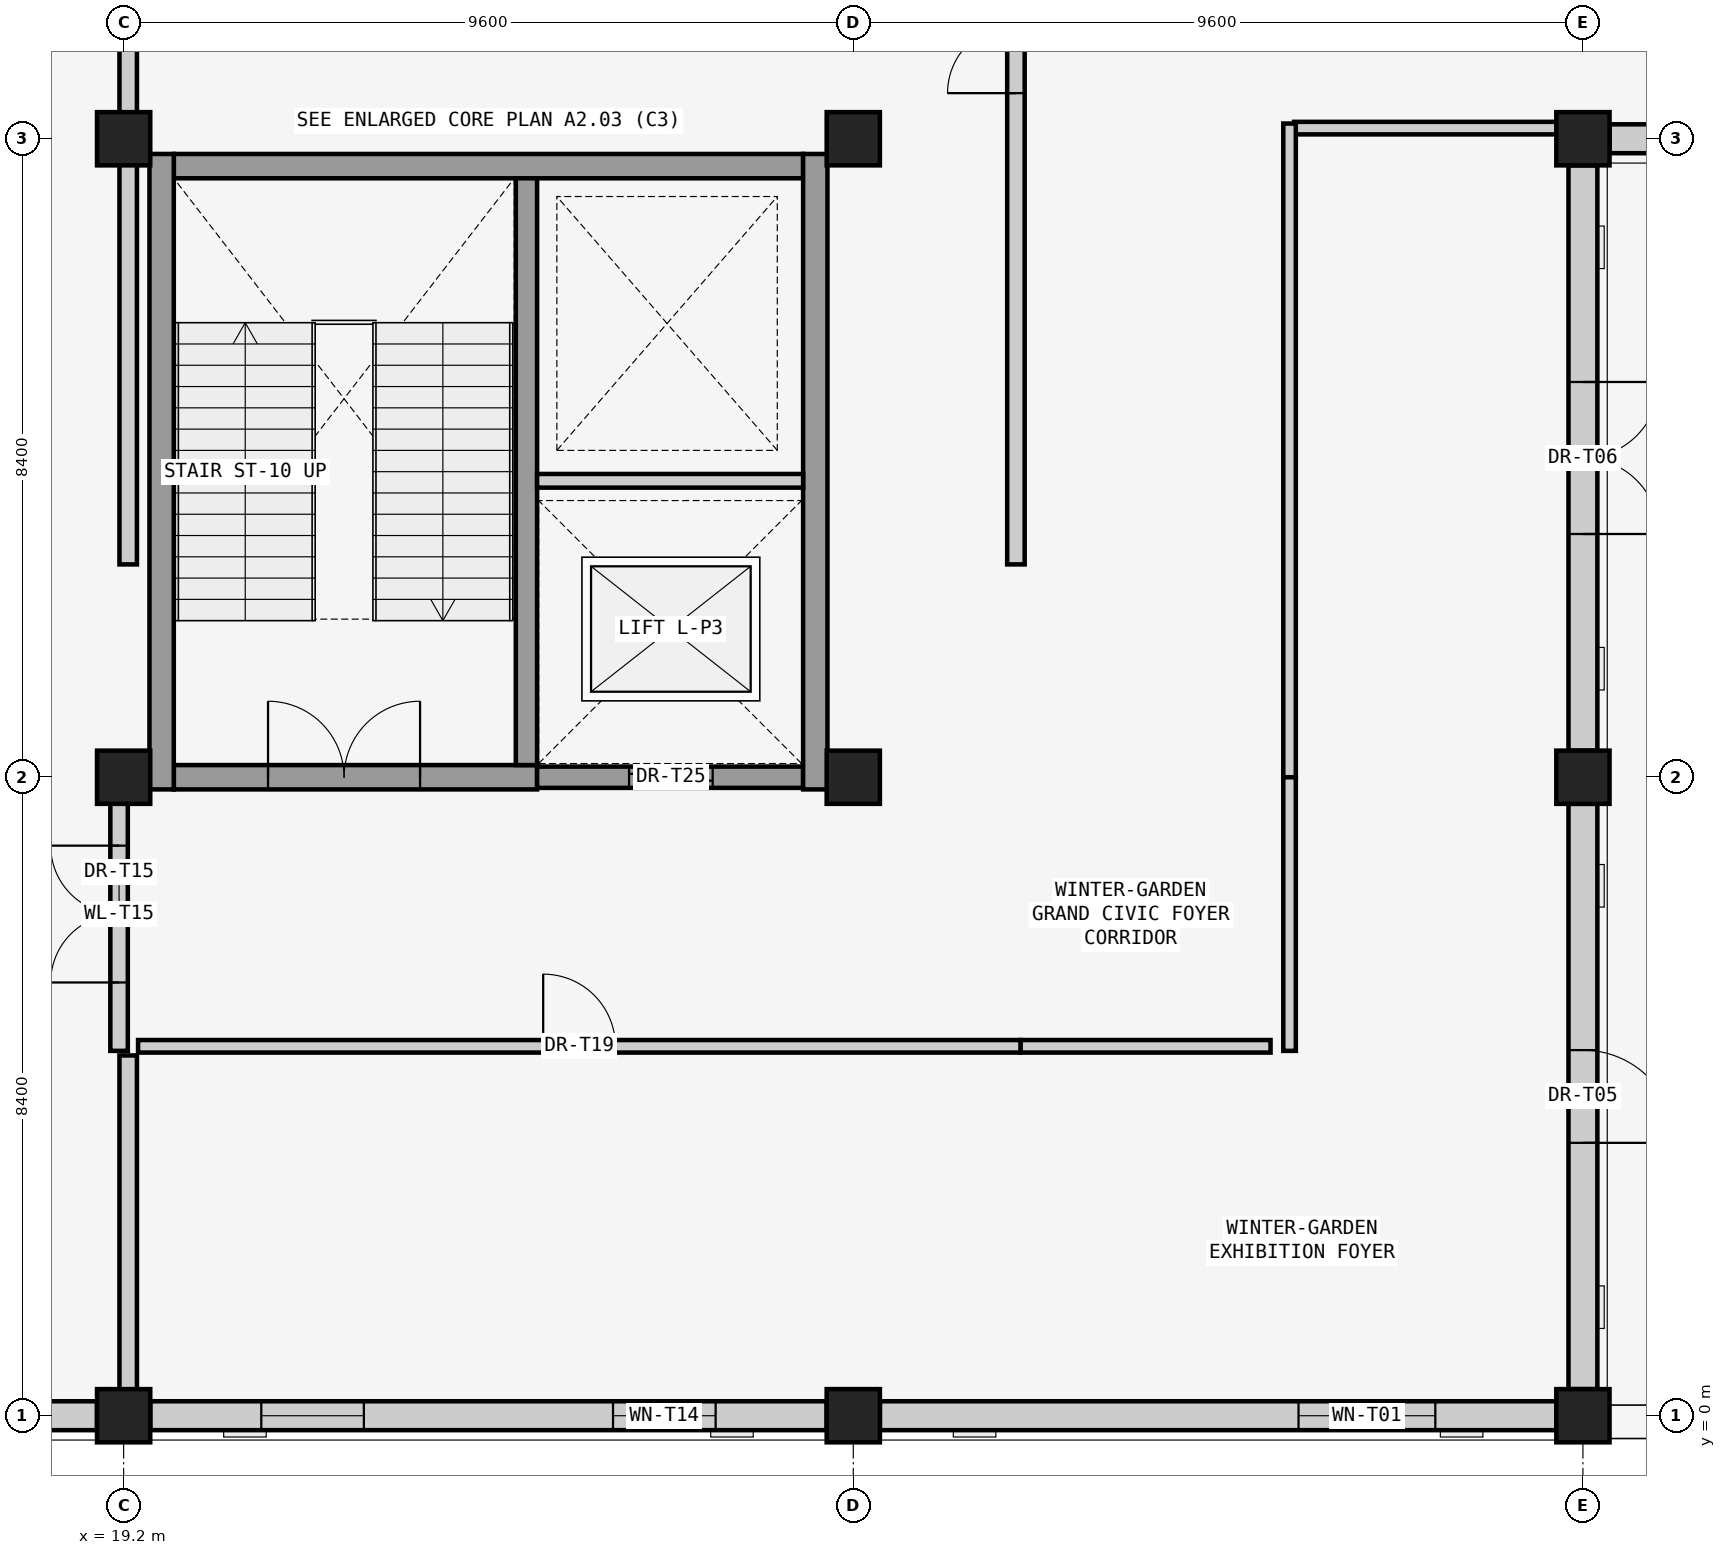
"""IFC4 building model, lengths in metres.
Left out: names, types, materials, properties, quantities, classifications, styles, units other than length and angle.
Written with IfcOpenShell. Run it as: python <this file> out.ifc"""

import sys

from ifc_helpers import new_model, si_unit, direction, frame, frame_2d, origin, origin_2d, place, context, subcontext, project, spatial, rectangle, extrude, element, fill, save


model = new_model("IFC4")
c1 = context("Model", 3, precision=1e-05, world=origin(), true_north=direction((0.0, 1.0)))
c2 = subcontext(c1, "Body", "Model", "MODEL_VIEW")
j1 = project(units=[si_unit("LENGTHUNIT", "METRE"), si_unit("PLANEANGLEUNIT", "RADIAN")], contexts=[c1])
p1 = place(None, origin())
s1 = spatial("IfcSite", under=j1, at=p1, CompositionType="ELEMENT")
p2 = place(p1, origin())
s2 = spatial("IfcBuilding", under=s1, at=p2, CompositionType="ELEMENT")
p3 = place(p2, origin())
s3 = spatial("IfcBuildingStorey", under=s2, at=p3, CompositionType="ELEMENT", Elevation=0.0)
for number, where, z_axis, x_axis in (
    (1, (19.2, 0.0, 0.0), (0.0, 0.0, 1.0), (1.0, 0.0, 0.0)),
    (2, (19.2, 8.4, 0.0), (0.0, 0.0, 1.0), (1.0, 0.0, 0.0)),
    (3, (19.2, 16.8, 0.0), (0.0, 0.0, 1.0), (1.0, 0.0, 0.0)),
    (4, (28.8, 0.0, 0.0), (0.0, 0.0, 1.0), (1.0, 0.0, 0.0)),
    (5, (28.8, 8.4, 0.0), (0.0, 0.0, 1.0), (1.0, 0.0, 0.0)),
    (6, (28.8, 16.8, 0.0), (0.0, 0.0, 1.0), (1.0, 0.0, 0.0)),
    (7, (38.4, 0.0, 0.0), (0.0, 0.0, 1.0), (1.0, 0.0, 0.0)),
    (8, (38.4, 8.4, 0.0), (0.0, 0.0, 1.0), (1.0, 0.0, 0.0)),
    (9, (38.4, 16.8, 0.0), (0.0, 0.0, 1.0), (1.0, 0.0, 0.0)),
):
    element("IfcColumn", number, at=place(p3, frame(where, z_axis=z_axis, x_axis=x_axis)), inside=s3, PredefinedType="COLUMN", context=c2, shape_type="SweptSolid", body=[
        extrude(rectangle(XDim=0.7, YDim=0.7, at=origin_2d()), origin(), (0.0, 0.0, 1.0), 5.12),
    ])
p4 = place(p3, frame((18.85, 0.0, 0.0), z_axis=(0.0, 0.0, 1.0), x_axis=(-1.0, 0.0, 0.0)))
e10 = element("IfcWall", 10, at=p4, inside=s3, PredefinedType="SOLIDWALL", context=c2, shape_type="SweptSolid", body=[
    extrude(rectangle(XDim=8.9, YDim=0.38, at=frame_2d((4.45, 0.0))), origin(), (0.0, 0.0, 1.0), 4.5),
])
p5 = place(p4, frame((1.292, 0.0, 0.95)))
e11 = element("IfcOpeningElement", 11, at=p5, cuts=e10, PredefinedType="OPENING", context=c2, shape_type="SweptSolid", body=[
    extrude(rectangle(XDim=2.4, YDim=2.2, at=frame_2d((1.2, 1.1))), frame((0.0, 0.2, 0.0), z_axis=(0.0, -1.0, 0.0), x_axis=(1.0, 0.0, 0.0)), (0.0, 0.0, 1.0), 0.4),
])
p6 = place(p3, frame((28.45, 0.0, 0.0), z_axis=(0.0, 0.0, 1.0), x_axis=(-1.0, 0.0, 0.0)))
e12 = element("IfcWall", 12, at=p6, inside=s3, PredefinedType="SOLIDWALL", context=c2, shape_type="SweptSolid", body=[
    extrude(rectangle(XDim=8.9, YDim=0.38, at=frame_2d((4.45, 0.0))), origin(), (0.0, 0.0, 1.0), 4.5),
])
p7 = place(p6, frame((1.461, 0.0, 0.85)))
e13 = element("IfcOpeningElement", 13, at=p7, cuts=e12, PredefinedType="OPENING", context=c2, shape_type="SweptSolid", body=[
    extrude(rectangle(XDim=1.35, YDim=2.6, at=frame_2d((0.675, 1.3))), frame((0.0, 0.2, 0.0), z_axis=(0.0, -1.0, 0.0), x_axis=(1.0, 0.0, 0.0)), (0.0, 0.0, 1.0), 0.4),
])
p8 = place(p6, frame((6.089, 0.0, 0.85)))
e14 = element("IfcOpeningElement", 14, at=p8, cuts=e12, PredefinedType="OPENING", context=c2, shape_type="SweptSolid", body=[
    extrude(rectangle(XDim=1.35, YDim=2.6, at=frame_2d((0.675, 1.3))), frame((0.0, 0.2, 0.0), z_axis=(0.0, -1.0, 0.0), x_axis=(1.0, 0.0, 0.0)), (0.0, 0.0, 1.0), 0.4),
])
p9 = place(p3, frame((38.05, 0.0, 0.0), z_axis=(0.0, 0.0, 1.0), x_axis=(-1.0, 0.0, 0.0)))
e15 = element("IfcWall", 15, at=p9, inside=s3, PredefinedType="SOLIDWALL", context=c2, shape_type="SweptSolid", body=[
    extrude(rectangle(XDim=8.9, YDim=0.38, at=frame_2d((4.45, 0.0))), origin(), (0.0, 0.0, 1.0), 4.5),
])
p10 = place(p9, frame((1.592, 0.0, 0.9)))
e16 = element("IfcOpeningElement", 16, at=p10, cuts=e15, PredefinedType="OPENING", context=c2, shape_type="SweptSolid", body=[
    extrude(rectangle(XDim=1.8, YDim=2.4, at=frame_2d((0.9, 1.2))), frame((0.0, 0.2, 0.0), z_axis=(0.0, -1.0, 0.0), x_axis=(1.0, 0.0, 0.0)), (0.0, 0.0, 1.0), 0.4),
])
p11 = place(p3, frame((38.4, 8.05, 0.0), z_axis=(0.0, 0.0, 1.0), x_axis=(0.0, -1.0, 0.0)))
e17 = element("IfcWall", 17, at=p11, inside=s3, PredefinedType="SOLIDWALL", context=c2, shape_type="SweptSolid", body=[
    extrude(rectangle(XDim=7.7, YDim=0.38, at=frame_2d((3.85, 0.0))), origin(), (0.0, 0.0, 1.0), 4.5),
])
p12 = place(p11, frame((3.24, 0.0, 0.0)))
e18 = element("IfcOpeningElement", 18, at=p12, cuts=e17, PredefinedType="OPENING", context=c2, shape_type="SweptSolid", body=[
    extrude(rectangle(XDim=1.22, YDim=2.25, at=frame_2d((0.61, 1.125))), frame((0.0, 0.2, 0.0), z_axis=(0.0, -1.0, 0.0), x_axis=(1.0, 0.0, 0.0)), (0.0, 0.0, 1.0), 0.4),
])
p13 = place(p3, frame((38.4, 16.45, 0.0), z_axis=(0.0, 0.0, 1.0), x_axis=(0.0, -1.0, 0.0)))
e19 = element("IfcWall", 19, at=p13, inside=s3, PredefinedType="SOLIDWALL", context=c2, shape_type="SweptSolid", body=[
    extrude(rectangle(XDim=7.7, YDim=0.38, at=frame_2d((3.85, 0.0))), origin(), (0.0, 0.0, 1.0), 4.5),
])
p14 = place(p13, frame((2.85, 0.0, 0.0)))
e20 = element("IfcOpeningElement", 20, at=p14, cuts=e19, PredefinedType="OPENING", context=c2, shape_type="SweptSolid", body=[
    extrude(rectangle(XDim=2.0, YDim=2.25, at=frame_2d((1.0, 1.125))), frame((0.0, 0.2, 0.0), z_axis=(0.0, -1.0, 0.0), x_axis=(1.0, 0.0, 0.0)), (0.0, 0.0, 1.0), 0.4),
])
p15 = place(p3, frame((47.65, 16.8, 0.0), z_axis=(0.0, 0.0, 1.0), x_axis=(-1.0, 0.0, 0.0)))
e21 = element("IfcWall", 21, at=p15, inside=s3, PredefinedType="SOLIDWALL", context=c2, shape_type="SweptSolid", body=[
    extrude(rectangle(XDim=8.9, YDim=0.38, at=frame_2d((4.45, 0.0))), origin(), (0.0, 0.0, 1.0), 4.5),
])
p16 = place(p15, frame((3.84, 0.0, 0.0)))
e22 = element("IfcOpeningElement", 22, at=p16, cuts=e21, PredefinedType="OPENING", context=c2, shape_type="SweptSolid", body=[
    extrude(rectangle(XDim=1.22, YDim=2.25, at=frame_2d((0.61, 1.125))), frame((0.0, 0.2, 0.0), z_axis=(0.0, -1.0, 0.0), x_axis=(1.0, 0.0, 0.0)), (0.0, 0.0, 1.0), 0.4),
])
p17 = place(p3, frame((19.86, 8.4, 0.0), z_axis=(0.0, 0.0, 1.0), x_axis=(1.0, 0.0, 0.0)))
e23 = element("IfcWall", 23, at=p17, inside=s3, PredefinedType="SHEAR", context=c2, shape_type="SweptSolid", body=[
    extrude(rectangle(XDim=4.78, YDim=0.32, at=frame_2d((2.39, 0.0))), origin(), (0.0, 0.0, 1.0), 5.1),
])
p18 = place(p17, frame((1.24, 0.0, 0.0)))
e24 = element("IfcOpeningElement", 24, at=p18, cuts=e23, PredefinedType="OPENING", context=c2, shape_type="SweptSolid", body=[
    extrude(rectangle(XDim=2.0, YDim=2.2, at=frame_2d((1.0, 1.1))), frame((0.0, 0.17, 0.0), z_axis=(0.0, -1.0, 0.0), x_axis=(1.0, 0.0, 0.0)), (0.0, 0.0, 1.0), 0.34),
])
p19 = place(p3, frame((24.64, 8.4, 0.0), z_axis=(0.0, 0.0, 1.0), x_axis=(1.0, 0.0, 0.0)))
e25 = element("IfcWall", 25, at=p19, inside=s3, PredefinedType="SHEAR", context=c2, shape_type="SweptSolid", body=[
    extrude(rectangle(XDim=3.5, YDim=0.28, at=frame_2d((1.75, 0.0))), origin(), (0.0, 0.0, 1.0), 5.1),
])
p20 = place(p19, frame((1.21, 0.0, 0.0)))
e26 = element("IfcOpeningElement", 26, at=p20, cuts=e25, PredefinedType="OPENING", context=c2, shape_type="SweptSolid", body=[
    extrude(rectangle(XDim=1.1, YDim=2.2, at=frame_2d((0.55, 1.1))), frame((0.0, 0.15, 0.0), z_axis=(0.0, -1.0, 0.0), x_axis=(1.0, 0.0, 0.0)), (0.0, 0.0, 1.0), 0.3),
])
p21 = place(p3, frame((28.14, 16.44, 0.0), z_axis=(0.0, 0.0, 1.0), x_axis=(-1.0, 0.0, 0.0)))
e27 = element("IfcWall", 27, at=p21, inside=s3, PredefinedType="SHEAR", context=c2, shape_type="SweptSolid", body=[
    extrude(rectangle(XDim=8.28, YDim=0.32, at=frame_2d((4.14, 0.0))), origin(), (0.0, 0.0, 1.0), 5.1),
])
for number, where, z_axis, x_axis in (
    (28, (19.7, 16.6, 0.0), (0.0, 0.0, 1.0), (0.0, -1.0, 0.0)),
    (29, (28.3, 8.24, 0.0), (0.0, 0.0, 1.0), (0.0, 1.0, 0.0)),
):
    element("IfcWall", number, at=place(p3, frame(where, z_axis=z_axis, x_axis=x_axis)), inside=s3, PredefinedType="SHEAR", context=c2, shape_type="SweptSolid", body=[
        extrude(rectangle(XDim=8.36, YDim=0.32, at=frame_2d((4.18, 0.0))), origin(), (0.0, 0.0, 1.0), 5.1),
    ])
p22 = place(p3, frame((24.5, 8.56, 0.0), z_axis=(0.0, 0.0, 1.0), x_axis=(0.0, 1.0, 0.0)))
e30 = element("IfcWall", 30, at=p22, inside=s3, PredefinedType="SHEAR", context=c2, shape_type="SweptSolid", body=[
    extrude(rectangle(XDim=7.72, YDim=0.28, at=frame_2d((3.86, 0.0))), origin(), (0.0, 0.0, 1.0), 5.1),
])
p23 = place(p3, frame((24.64, 12.3, 0.0), z_axis=(0.0, 0.0, 1.0), x_axis=(1.0, 0.0, 0.0)))
e31 = element("IfcWall", 31, at=p23, inside=s3, PredefinedType="SOLIDWALL", context=c2, shape_type="SweptSolid", body=[
    extrude(rectangle(XDim=3.5, YDim=0.18, at=frame_2d((1.75, 0.0))), origin(), (0.0, 0.0, 1.0), 5.1),
])
p24 = place(p3, frame((19.14, 4.8, 0.0), z_axis=(0.0, 0.0, 1.0), x_axis=(0.0, 1.0, 0.0)))
e32 = element("IfcWall", 32, at=p24, inside=s3, PredefinedType="SOLIDWALL", context=c2, shape_type="SweptSolid", body=[
    extrude(rectangle(XDim=3.6, YDim=0.23, at=frame_2d((1.8, 0.0))), origin(), (0.0, 0.0, 1.0), 4.4),
])
p25 = place(p24, frame((0.9, 0.0, 0.0)))
e33 = element("IfcOpeningElement", 33, at=p25, cuts=e32, PredefinedType="OPENING", context=c2, shape_type="SweptSolid", body=[
    extrude(rectangle(XDim=1.8, YDim=2.3, at=frame_2d((0.9, 1.15))), frame((0.0, 0.125, 0.0), z_axis=(0.0, -1.0, 0.0), x_axis=(1.0, 0.0, 0.0)), (0.0, 0.0, 1.0), 0.25),
])
p26 = place(p3, frame((30.94, 11.2, 0.0), z_axis=(0.0, 0.0, 1.0), x_axis=(0.0, 1.0, 0.0)))
e34 = element("IfcWall", 34, at=p26, inside=s3, PredefinedType="SOLIDWALL", context=c2, shape_type="SweptSolid", body=[
    extrude(rectangle(XDim=14.2, YDim=0.23, at=frame_2d((7.1, 0.0))), origin(), (0.0, 0.0, 1.0), 4.99),
])
p27 = place(p26, frame((6.2, 0.0, 0.0)))
e35 = element("IfcOpeningElement", 35, at=p27, cuts=e34, PredefinedType="OPENING", context=c2, shape_type="SweptSolid", body=[
    extrude(rectangle(XDim=1.8, YDim=2.3, at=frame_2d((0.9, 1.15))), frame((0.0, 0.125, 0.0), z_axis=(0.0, -1.0, 0.0), x_axis=(1.0, 0.0, 0.0)), (0.0, 0.0, 1.0), 0.25),
])
p28 = place(p3, frame((34.6, 16.94, 0.0), z_axis=(0.0, 0.0, 1.0), x_axis=(1.0, 0.0, 0.0)))
e36 = element("IfcWall", 36, at=p28, inside=s3, PredefinedType="PARTITIONING", context=c2, shape_type="SweptSolid", body=[
    extrude(rectangle(XDim=3.709, YDim=0.165, at=frame_2d((1.854, 0.0))), origin(), (0.0, 0.0, 1.0), 4.25),
])
p29 = place(p3, frame((34.54, 8.4, 0.0), z_axis=(0.0, 0.0, 1.0), x_axis=(0.0, 1.0, 0.0)))
e37 = element("IfcWall", 37, at=p29, inside=s3, PredefinedType="PARTITIONING", context=c2, shape_type="SweptSolid", body=[
    extrude(rectangle(XDim=8.6, YDim=0.165, at=frame_2d((4.3, 0.0))), origin(), (0.0, 0.0, 1.0), 4.99),
])
p30 = place(p3, frame((34.54, 4.8, 0.0), z_axis=(0.0, 0.0, 1.0), x_axis=(0.0, 1.0, 0.0)))
e38 = element("IfcWall", 38, at=p30, inside=s3, PredefinedType="PARTITIONING", context=c2, shape_type="SweptSolid", body=[
    extrude(rectangle(XDim=3.6, YDim=0.165, at=frame_2d((1.8, 0.0))), origin(), (0.0, 0.0, 1.0), 4.99),
])
p31 = place(p3, frame((31.0, 4.86, 0.0), z_axis=(0.0, 0.0, 1.0), x_axis=(1.0, 0.0, 0.0)))
e39 = element("IfcWall", 39, at=p31, inside=s3, PredefinedType="PARTITIONING", context=c2, shape_type="SweptSolid", body=[
    extrude(rectangle(XDim=3.29, YDim=0.165, at=frame_2d((1.645, 0.0))), origin(), (0.0, 0.0, 1.0), 4.99),
])
p32 = place(p3, frame((19.39, 4.86, 0.0), z_axis=(0.0, 0.0, 1.0), x_axis=(1.0, 0.0, 0.0)))
e40 = element("IfcWall", 40, at=p32, inside=s3, PredefinedType="PARTITIONING", context=c2, shape_type="SweptSolid", body=[
    extrude(rectangle(XDim=11.61, YDim=0.165, at=frame_2d((5.805, 0.0))), origin(), (0.0, 0.0, 1.0), 4.99),
])
p33 = place(p32, frame((5.33, 0.0, 0.0)))
e41 = element("IfcOpeningElement", 41, at=p33, cuts=e40, PredefinedType="OPENING", context=c2, shape_type="SweptSolid", body=[
    extrude(rectangle(XDim=0.95, YDim=2.15, at=frame_2d((0.475, 1.075))), frame((0.0, 0.093, 0.0), z_axis=(0.0, -1.0, 0.0), x_axis=(1.0, 0.0, 0.0)), (0.0, 0.0, 1.0), 0.185),
])
p34 = place(p3, frame((19.26, 11.2, 0.0), z_axis=(0.0, 0.0, 1.0), x_axis=(0.0, 1.0, 0.0)))
e42 = element("IfcWall", 42, at=p34, inside=s3, PredefinedType="SOLIDWALL", context=c2, shape_type="SweptSolid", body=[
    extrude(rectangle(XDim=13.78, YDim=0.23, at=frame_2d((6.89, 0.0))), origin(), (0.0, 0.0, 1.0), 4.4),
])
p35 = place(p3, frame((19.26, 0.22, 0.0), z_axis=(0.0, 0.0, 1.0), x_axis=(0.0, 1.0, 0.0)))
e43 = element("IfcWall", 43, at=p35, inside=s3, PredefinedType="SOLIDWALL", context=c2, shape_type="SweptSolid", body=[
    extrude(rectangle(XDim=4.52, YDim=0.23, at=frame_2d((2.26, 0.0))), origin(), (0.0, 0.0, 1.0), 4.4),
])
p36 = place(p7, origin())
e44 = element("IfcWindow", 44, at=p36, inside=s3, PartitioningType="SINGLE_PANEL", PredefinedType="WINDOW", context=c2, shape_type="SweptSolid", body=[
    extrude(rectangle(XDim=1.35, YDim=2.6, at=frame_2d((0.675, 1.3))), frame((0.0, 0.03, 0.0), z_axis=(0.0, -1.0, 0.0), x_axis=(1.0, 0.0, 0.0)), (0.0, 0.0, 1.0), 0.06),
])
fill(e13, e44)
p37 = place(p8, origin())
e45 = element("IfcWindow", 45, at=p37, inside=s3, PartitioningType="SINGLE_PANEL", PredefinedType="WINDOW", context=c2, shape_type="SweptSolid", body=[
    extrude(rectangle(XDim=1.35, YDim=2.6, at=frame_2d((0.675, 1.3))), frame((0.0, 0.03, 0.0), z_axis=(0.0, -1.0, 0.0), x_axis=(1.0, 0.0, 0.0)), (0.0, 0.0, 1.0), 0.06),
])
fill(e14, e45)
p38 = place(p10, origin())
e46 = element("IfcWindow", 46, at=p38, inside=s3, PartitioningType="SINGLE_PANEL", PredefinedType="WINDOW", context=c2, shape_type="SweptSolid", body=[
    extrude(rectangle(XDim=1.8, YDim=2.4, at=frame_2d((0.9, 1.2))), frame((0.0, 0.03, 0.0), z_axis=(0.0, -1.0, 0.0), x_axis=(1.0, 0.0, 0.0)), (0.0, 0.0, 1.0), 0.06),
])
fill(e16, e46)
p39 = place(p12, origin())
e47 = element("IfcDoor", 47, at=p39, inside=s3, OperationType="SINGLE_SWING_RIGHT", PredefinedType="DOOR", context=c2, shape_type="SweptSolid", body=[
    extrude(rectangle(XDim=1.22, YDim=2.25, at=frame_2d((0.61, 1.125))), frame((0.0, 0.025, 0.0), z_axis=(0.0, -1.0, 0.0), x_axis=(1.0, 0.0, 0.0)), (0.0, 0.0, 1.0), 0.05),
])
fill(e18, e47)
p40 = place(p14, origin())
e48 = element("IfcDoor", 48, at=p40, inside=s3, OperationType="DOUBLE_DOOR_SINGLE_SWING", PredefinedType="DOOR", context=c2, shape_type="SweptSolid", body=[
    extrude(rectangle(XDim=2.0, YDim=2.25, at=frame_2d((1.0, 1.125))), frame((0.0, 0.025, 0.0), z_axis=(0.0, -1.0, 0.0), x_axis=(1.0, 0.0, 0.0)), (0.0, 0.0, 1.0), 0.05),
])
fill(e20, e48)
p41 = place(p18, origin())
e49 = element("IfcDoor", 49, at=p41, inside=s3, OperationType="DOUBLE_SWING_LEFT", PredefinedType="DOOR", context=c2, shape_type="SweptSolid", body=[
    extrude(rectangle(XDim=2.0, YDim=2.2, at=frame_2d((1.0, 1.1))), frame((0.0, 0.025, 0.0), z_axis=(0.0, -1.0, 0.0), x_axis=(1.0, 0.0, 0.0)), (0.0, 0.0, 1.0), 0.05),
])
fill(e24, e49)
p42 = place(p20, origin())
e50 = element("IfcDoor", 50, at=p42, inside=s3, OperationType="SLIDING_TO_LEFT", PredefinedType="DOOR", context=c2, shape_type="SweptSolid", body=[
    extrude(rectangle(XDim=1.1, YDim=2.2, at=frame_2d((0.55, 1.1))), frame((0.0, 0.025, 0.0), z_axis=(0.0, -1.0, 0.0), x_axis=(1.0, 0.0, 0.0)), (0.0, 0.0, 1.0), 0.05),
])
fill(e26, e50)
p43 = place(p25, origin())
e51 = element("IfcDoor", 51, at=p43, inside=s3, OperationType="DOUBLE_SWING_LEFT", PredefinedType="DOOR", context=c2, shape_type="SweptSolid", body=[
    extrude(rectangle(XDim=1.8, YDim=2.3, at=frame_2d((0.9, 1.15))), frame((0.0, 0.025, 0.0), z_axis=(0.0, -1.0, 0.0), x_axis=(1.0, 0.0, 0.0)), (0.0, 0.0, 1.0), 0.05),
])
fill(e33, e51)
p44 = place(p27, origin())
e52 = element("IfcDoor", 52, at=p44, inside=s3, OperationType="DOUBLE_SWING_LEFT", PredefinedType="DOOR", context=c2, shape_type="SweptSolid", body=[
    extrude(rectangle(XDim=1.8, YDim=2.3, at=frame_2d((0.9, 1.15))), frame((0.0, 0.025, 0.0), z_axis=(0.0, -1.0, 0.0), x_axis=(1.0, 0.0, 0.0)), (0.0, 0.0, 1.0), 0.05),
])
fill(e35, e52)
p45 = place(p33, origin())
e53 = element("IfcDoor", 53, at=p45, inside=s3, OperationType="SINGLE_SWING_LEFT", PredefinedType="DOOR", context=c2, shape_type="SweptSolid", body=[
    extrude(rectangle(XDim=0.95, YDim=2.15, at=frame_2d((0.475, 1.075))), frame((0.0, 0.025, 0.0), z_axis=(0.0, -1.0, 0.0), x_axis=(1.0, 0.0, 0.0)), (0.0, 0.0, 1.0), 0.05),
])
fill(e41, e53)
save(model, sys.argv[1])
